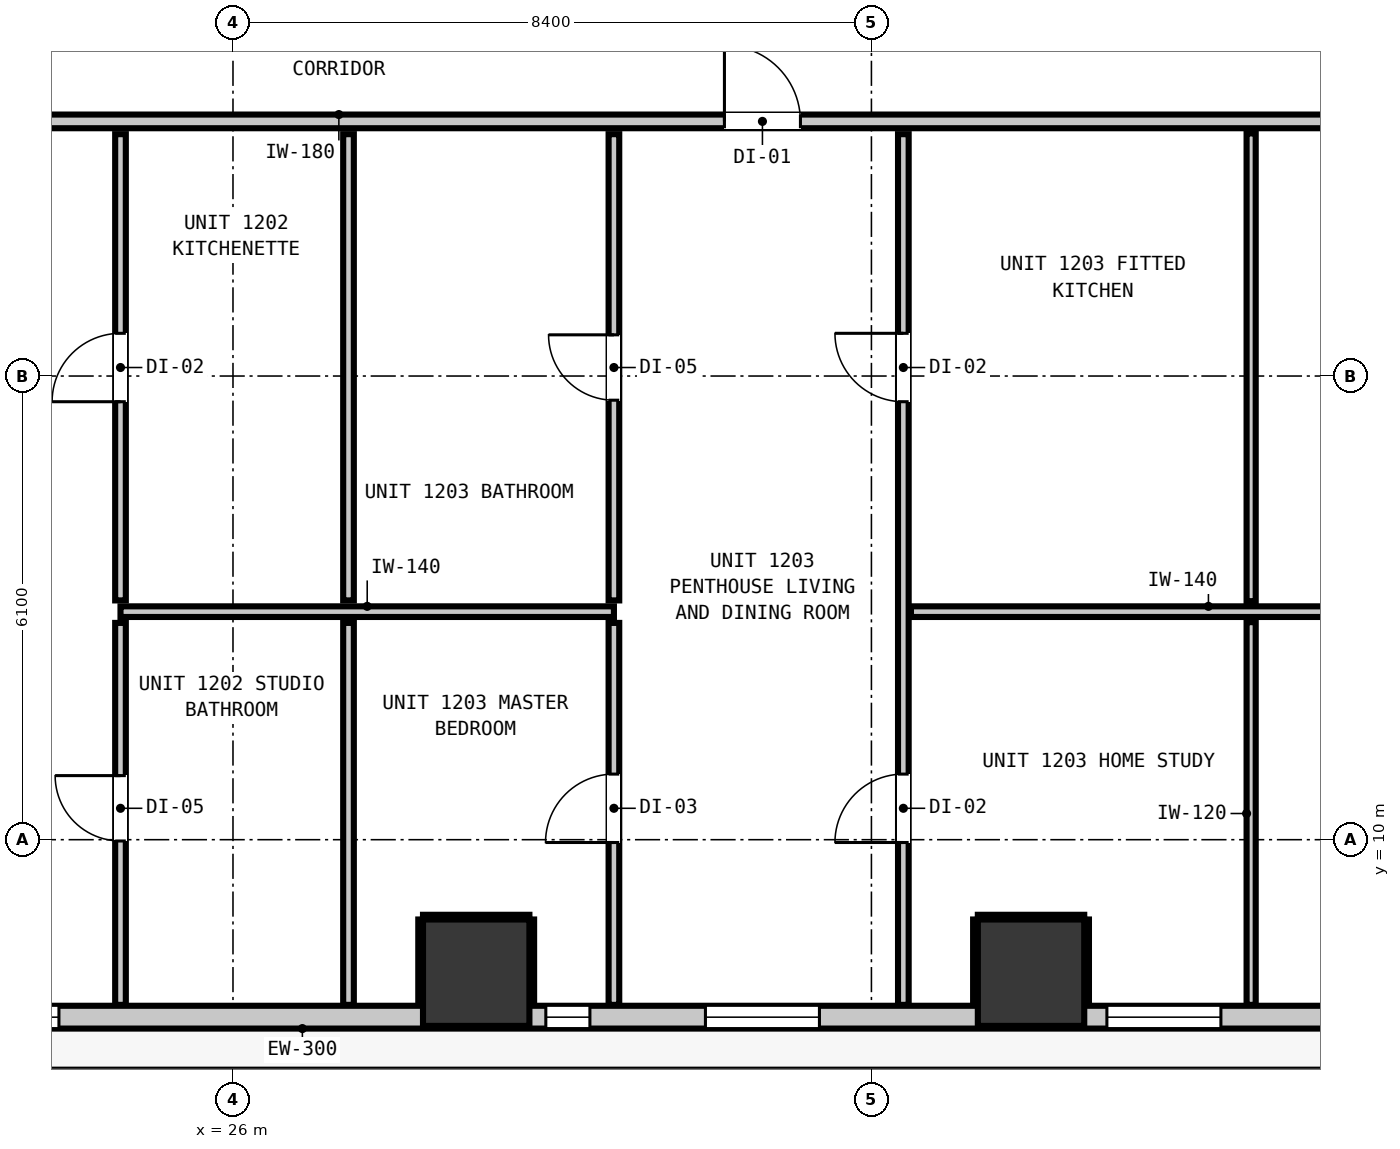
"""IFC4 building model, lengths in metres.
Left out: names, types, materials, properties, quantities, classifications, styles, units other than length and angle.
Written with IfcOpenShell. Run it as: python <this file> out.ifc"""

import sys

from ifc_helpers import new_model, si_unit, direction, frame, frame_2d, origin, origin_2d, place, context, subcontext, project, spatial, rectangle, extrude, element, fill, save


model = new_model("IFC4")
c1 = context("Model", 3, precision=1e-05, world=origin(), true_north=direction((0.0, 1.0)))
c2 = subcontext(c1, "Body", "Model", "MODEL_VIEW")
j1 = project(units=[si_unit("LENGTHUNIT", "METRE"), si_unit("PLANEANGLEUNIT", "RADIAN")], contexts=[c1])
p1 = place(None, origin())
s1 = spatial("IfcSite", under=j1, at=p1, CompositionType="ELEMENT")
p2 = place(p1, origin())
s2 = spatial("IfcBuilding", under=s1, at=p2, CompositionType="ELEMENT")
p3 = place(p2, frame((0.0, 0.0, 45.24)))
s3 = spatial("IfcBuildingStorey", under=s2, at=p3, CompositionType="ELEMENT", Elevation=45.24)
for number, where, z_axis, x_axis in (
    (1, (29.2, 8.25, 0.0), (0.0, 0.0, 1.0), (1.0, 0.0, 0.0)),
    (2, (36.5, 8.25, 0.0), (0.0, 0.0, 1.0), (1.0, 0.0, 0.0)),
):
    element("IfcColumn", number, at=place(p3, frame(where, z_axis=z_axis, x_axis=x_axis)), inside=s3, PredefinedType="COLUMN", context=c2, shape_type="SweptSolid", body=[
        extrude(rectangle(XDim=1.4, YDim=1.4, at=origin_2d()), origin(), (0.0, 0.0, 1.0), 3.32),
    ])
p4 = place(p3, frame((47.835, 7.665, 0.0), z_axis=(0.0, 0.0, 1.0), x_axis=(-1.0, 0.0, 0.0)))
e3 = element("IfcWall", 3, at=p4, inside=s3, PredefinedType="STANDARD", context=c2, shape_type="SweptSolid", body=[
    extrude(rectangle(XDim=37.47, YDim=0.3, at=frame_2d((18.735, 0.0))), origin(), (0.0, 0.0, 1.0), 3.06),
])
p5 = place(p4, frame((1.251, 0.0, 0.0)))
e4 = element("IfcOpeningElement", 4, at=p5, cuts=e3, PredefinedType="OPENING", context=c2, shape_type="SweptSolid", body=[
    extrude(rectangle(XDim=1.0, YDim=2.15, at=frame_2d((0.5, 1.075))), frame((0.0, 0.16, 0.0), z_axis=(0.0, -1.0, 0.0), x_axis=(1.0, 0.0, 0.0)), (0.0, 0.0, 1.0), 0.32),
])
p6 = place(p4, frame((30.525, 0.0, 0.85)))
e5 = element("IfcOpeningElement", 5, at=p6, cuts=e3, PredefinedType="OPENING", context=c2, shape_type="SweptSolid", body=[
    extrude(rectangle(XDim=1.5, YDim=1.8, at=frame_2d((0.75, 0.9))), frame((0.0, 0.16, 0.0), z_axis=(0.0, -1.0, 0.0), x_axis=(1.0, 0.0, 0.0)), (0.0, 0.0, 1.0), 0.32),
])
p7 = place(p4, frame((24.125, 0.0, 0.85)))
e6 = element("IfcOpeningElement", 6, at=p7, cuts=e3, PredefinedType="OPENING", context=c2, shape_type="SweptSolid", body=[
    extrude(rectangle(XDim=1.5, YDim=1.8, at=frame_2d((0.75, 0.9))), frame((0.0, 0.16, 0.0), z_axis=(0.0, -1.0, 0.0), x_axis=(1.0, 0.0, 0.0)), (0.0, 0.0, 1.0), 0.32),
])
p8 = place(p4, frame((14.119, 0.0, 0.85)))
e7 = element("IfcOpeningElement", 7, at=p8, cuts=e3, PredefinedType="OPENING", context=c2, shape_type="SweptSolid", body=[
    extrude(rectangle(XDim=1.5, YDim=1.8, at=frame_2d((0.75, 0.9))), frame((0.0, 0.16, 0.0), z_axis=(0.0, -1.0, 0.0), x_axis=(1.0, 0.0, 0.0)), (0.0, 0.0, 1.0), 0.32),
])
p9 = place(p4, frame((17.139, 0.0, 0.85)))
e8 = element("IfcOpeningElement", 8, at=p9, cuts=e3, PredefinedType="OPENING", context=c2, shape_type="SweptSolid", body=[
    extrude(rectangle(XDim=0.58, YDim=1.5, at=frame_2d((0.29, 0.75))), frame((0.0, 0.16, 0.0), z_axis=(0.0, -1.0, 0.0), x_axis=(1.0, 0.0, 0.0)), (0.0, 0.0, 1.0), 0.32),
])
p10 = place(p4, frame((8.837, 0.0, 0.85)))
e9 = element("IfcOpeningElement", 9, at=p10, cuts=e3, PredefinedType="OPENING", context=c2, shape_type="SweptSolid", body=[
    extrude(rectangle(XDim=1.5, YDim=1.8, at=frame_2d((0.75, 0.9))), frame((0.0, 0.16, 0.0), z_axis=(0.0, -1.0, 0.0), x_axis=(1.0, 0.0, 0.0)), (0.0, 0.0, 1.0), 0.32),
])
p11 = place(p4, frame((4.645, 0.0, 0.85)))
e10 = element("IfcOpeningElement", 10, at=p11, cuts=e3, PredefinedType="OPENING", context=c2, shape_type="SweptSolid", body=[
    extrude(rectangle(XDim=1.5, YDim=1.8, at=frame_2d((0.75, 0.9))), frame((0.0, 0.16, 0.0), z_axis=(0.0, -1.0, 0.0), x_axis=(1.0, 0.0, 0.0)), (0.0, 0.0, 1.0), 0.32),
])
p12 = place(p3, frame((8.027, 19.45, 0.0), z_axis=(0.0, 0.0, 1.0), x_axis=(1.0, 0.0, 0.0)))
e11 = element("IfcWall", 11, at=p12, inside=s3, PredefinedType="PARTITIONING", context=c2, shape_type="SweptSolid", body=[
    extrude(rectangle(XDim=42.146, YDim=0.18, at=frame_2d((21.073, 0.0))), origin(), (0.0, 0.0, 1.0), 3.06),
])
p13 = place(p12, frame((6.533, 0.0, 0.0)))
e12 = element("IfcOpeningElement", 12, at=p13, cuts=e11, PredefinedType="OPENING", context=c2, shape_type="SweptSolid", body=[
    extrude(rectangle(XDim=1.0, YDim=2.15, at=frame_2d((0.5, 1.075))), frame((0.0, 0.1, 0.0), z_axis=(0.0, -1.0, 0.0), x_axis=(1.0, 0.0, 0.0)), (0.0, 0.0, 1.0), 0.2),
])
p14 = place(p12, frame((13.293, 0.0, 0.0)))
e13 = element("IfcOpeningElement", 13, at=p14, cuts=e11, PredefinedType="OPENING", context=c2, shape_type="SweptSolid", body=[
    extrude(rectangle(XDim=1.0, YDim=2.15, at=frame_2d((0.5, 1.075))), frame((0.0, 0.1, 0.0), z_axis=(0.0, -1.0, 0.0), x_axis=(1.0, 0.0, 0.0)), (0.0, 0.0, 1.0), 0.2),
])
p15 = place(p12, frame((24.439, 0.0, 0.0)))
e14 = element("IfcOpeningElement", 14, at=p15, cuts=e11, PredefinedType="OPENING", context=c2, shape_type="SweptSolid", body=[
    extrude(rectangle(XDim=1.0, YDim=2.15, at=frame_2d((0.5, 1.075))), frame((0.0, 0.1, 0.0), z_axis=(0.0, -1.0, 0.0), x_axis=(1.0, 0.0, 0.0)), (0.0, 0.0, 1.0), 0.2),
])
p16 = place(p12, frame((34.771, 0.0, 0.0)))
e15 = element("IfcOpeningElement", 15, at=p16, cuts=e11, PredefinedType="OPENING", context=c2, shape_type="SweptSolid", body=[
    extrude(rectangle(XDim=1.0, YDim=2.15, at=frame_2d((0.5, 1.075))), frame((0.0, 0.1, 0.0), z_axis=(0.0, -1.0, 0.0), x_axis=(1.0, 0.0, 0.0)), (0.0, 0.0, 1.0), 0.2),
])
p17 = place(p3, frame((24.52, 13.0, 0.0), z_axis=(0.0, 0.0, 1.0), x_axis=(1.0, 0.0, 0.0)))
e16 = element("IfcWall", 16, at=p17, inside=s3, PredefinedType="PARTITIONING", context=c2, shape_type="SweptSolid", body=[
    extrude(rectangle(XDim=6.492, YDim=0.14, at=frame_2d((3.246, 0.0))), origin(), (0.0, 0.0, 1.0), 3.06),
])
p18 = place(p3, frame((34.92, 13.0, 0.0), z_axis=(0.0, 0.0, 1.0), x_axis=(1.0, 0.0, 0.0)))
e17 = element("IfcWall", 17, at=p18, inside=s3, PredefinedType="PARTITIONING", context=c2, shape_type="SweptSolid", body=[
    extrude(rectangle(XDim=15.253, YDim=0.14, at=frame_2d((7.626, 0.0))), origin(), (0.0, 0.0, 1.0), 3.06),
])
p19 = place(p18, frame((7.928, 0.0, 0.0)))
e18 = element("IfcOpeningElement", 18, at=p19, cuts=e17, PredefinedType="OPENING", context=c2, shape_type="SweptSolid", body=[
    extrude(rectangle(XDim=0.9, YDim=2.1, at=frame_2d((0.45, 1.05))), frame((0.0, 0.08, 0.0), z_axis=(0.0, -1.0, 0.0), x_axis=(1.0, 0.0, 0.0)), (0.0, 0.0, 1.0), 0.16),
])
p20 = place(p3, frame((24.52, 7.827, 0.0), z_axis=(0.0, 0.0, 1.0), x_axis=(0.0, 1.0, 0.0)))
e19 = element("IfcWall", 19, at=p20, inside=s3, PredefinedType="PARTITIONING", context=c2, shape_type="SweptSolid", body=[
    extrude(rectangle(XDim=5.025, YDim=0.14, at=frame_2d((2.513, 0.0))), origin(), (0.0, 0.0, 1.0), 3.06),
])
p21 = place(p20, frame((2.156, 0.0, 0.0)))
e20 = element("IfcOpeningElement", 20, at=p21, cuts=e19, PredefinedType="OPENING", context=c2, shape_type="SweptSolid", body=[
    extrude(rectangle(XDim=0.86, YDim=2.02, at=frame_2d((0.43, 1.01))), frame((0.0, 0.08, 0.0), z_axis=(0.0, -1.0, 0.0), x_axis=(1.0, 0.0, 0.0)), (0.0, 0.0, 1.0), 0.16),
])
p22 = place(p3, frame((24.52, 13.148, 0.0), z_axis=(0.0, 0.0, 1.0), x_axis=(0.0, 1.0, 0.0)))
e21 = element("IfcWall", 21, at=p22, inside=s3, PredefinedType="PARTITIONING", context=c2, shape_type="SweptSolid", body=[
    extrude(rectangle(XDim=6.134, YDim=0.14, at=frame_2d((3.067, 0.0))), origin(), (0.0, 0.0, 1.0), 3.06),
])
p23 = place(p22, frame((2.614, 0.0, 0.0)))
e22 = element("IfcOpeningElement", 22, at=p23, cuts=e21, PredefinedType="OPENING", context=c2, shape_type="SweptSolid", body=[
    extrude(rectangle(XDim=0.9, YDim=2.1, at=frame_2d((0.45, 1.05))), frame((0.0, 0.08, 0.0), z_axis=(0.0, -1.0, 0.0), x_axis=(1.0, 0.0, 0.0)), (0.0, 0.0, 1.0), 0.16),
])
p24 = place(p3, frame((27.52, 7.827, 0.0), z_axis=(0.0, 0.0, 1.0), x_axis=(0.0, 1.0, 0.0)))
e23 = element("IfcWall", 23, at=p24, inside=s3, PredefinedType="PARTITIONING", context=c2, shape_type="SweptSolid", body=[
    extrude(rectangle(XDim=5.025, YDim=0.14, at=frame_2d((2.513, 0.0))), origin(), (0.0, 0.0, 1.0), 3.06),
])
p25 = place(p3, frame((27.52, 13.148, 0.0), z_axis=(0.0, 0.0, 1.0), x_axis=(0.0, 1.0, 0.0)))
e24 = element("IfcWall", 24, at=p25, inside=s3, PredefinedType="PARTITIONING", context=c2, shape_type="SweptSolid", body=[
    extrude(rectangle(XDim=6.134, YDim=0.14, at=frame_2d((3.067, 0.0))), origin(), (0.0, 0.0, 1.0), 3.06),
])
p26 = place(p3, frame((31.012, 7.827, 0.0), z_axis=(0.0, 0.0, 1.0), x_axis=(0.0, 1.0, 0.0)))
e25 = element("IfcWall", 25, at=p26, inside=s3, PredefinedType="PARTITIONING", context=c2, shape_type="SweptSolid", body=[
    extrude(rectangle(XDim=5.025, YDim=0.14, at=frame_2d((2.513, 0.0))), origin(), (0.0, 0.0, 1.0), 3.06),
])
p27 = place(p26, frame((2.136, 0.0, 0.0)))
e26 = element("IfcOpeningElement", 26, at=p27, cuts=e25, PredefinedType="OPENING", context=c2, shape_type="SweptSolid", body=[
    extrude(rectangle(XDim=0.9, YDim=2.1, at=frame_2d((0.45, 1.05))), frame((0.0, 0.08, 0.0), z_axis=(0.0, -1.0, 0.0), x_axis=(1.0, 0.0, 0.0)), (0.0, 0.0, 1.0), 0.16),
])
p28 = place(p3, frame((31.012, 13.148, 0.0), z_axis=(0.0, 0.0, 1.0), x_axis=(0.0, 1.0, 0.0)))
e27 = element("IfcWall", 27, at=p28, inside=s3, PredefinedType="PARTITIONING", context=c2, shape_type="SweptSolid", body=[
    extrude(rectangle(XDim=6.134, YDim=0.14, at=frame_2d((3.067, 0.0))), origin(), (0.0, 0.0, 1.0), 3.06),
])
p29 = place(p28, frame((2.634, 0.0, 0.0)))
e28 = element("IfcOpeningElement", 28, at=p29, cuts=e27, PredefinedType="OPENING", context=c2, shape_type="SweptSolid", body=[
    extrude(rectangle(XDim=0.86, YDim=2.02, at=frame_2d((0.43, 1.01))), frame((0.0, 0.08, 0.0), z_axis=(0.0, -1.0, 0.0), x_axis=(1.0, 0.0, 0.0)), (0.0, 0.0, 1.0), 0.16),
])
p30 = place(p3, frame((34.82, 7.827, 0.0), z_axis=(0.0, 0.0, 1.0), x_axis=(0.0, 1.0, 0.0)))
e29 = element("IfcWall", 29, at=p30, inside=s3, PredefinedType="PARTITIONING", context=c2, shape_type="SweptSolid", body=[
    extrude(rectangle(XDim=11.455, YDim=0.14, at=frame_2d((5.728, 0.0))), origin(), (0.0, 0.0, 1.0), 3.06),
])
p31 = place(p30, frame((7.935, 0.0, 0.0)))
e30 = element("IfcOpeningElement", 30, at=p31, cuts=e29, PredefinedType="OPENING", context=c2, shape_type="SweptSolid", body=[
    extrude(rectangle(XDim=0.9, YDim=2.1, at=frame_2d((0.45, 1.05))), frame((0.0, 0.08, 0.0), z_axis=(0.0, -1.0, 0.0), x_axis=(1.0, 0.0, 0.0)), (0.0, 0.0, 1.0), 0.16),
])
p32 = place(p30, frame((2.136, 0.0, 0.0)))
e31 = element("IfcOpeningElement", 31, at=p32, cuts=e29, PredefinedType="OPENING", context=c2, shape_type="SweptSolid", body=[
    extrude(rectangle(XDim=0.9, YDim=2.1, at=frame_2d((0.45, 1.05))), frame((0.0, 0.08, 0.0), z_axis=(0.0, -1.0, 0.0), x_axis=(1.0, 0.0, 0.0)), (0.0, 0.0, 1.0), 0.16),
])
p33 = place(p3, frame((39.396, 7.827, 0.0), z_axis=(0.0, 0.0, 1.0), x_axis=(0.0, 1.0, 0.0)))
e32 = element("IfcWall", 32, at=p33, inside=s3, PredefinedType="PARTITIONING", context=c2, shape_type="SweptSolid", body=[
    extrude(rectangle(XDim=5.035, YDim=0.12, at=frame_2d((2.518, 0.0))), origin(), (0.0, 0.0, 1.0), 3.06),
])
p34 = place(p3, frame((39.396, 13.138, 0.0), z_axis=(0.0, 0.0, 1.0), x_axis=(0.0, 1.0, 0.0)))
e33 = element("IfcWall", 33, at=p34, inside=s3, PredefinedType="PARTITIONING", context=c2, shape_type="SweptSolid", body=[
    extrude(rectangle(XDim=6.154, YDim=0.12, at=frame_2d((3.077, 0.0))), origin(), (0.0, 0.0, 1.0), 3.06),
])
p35 = place(p3, frame((28.5, 8.982, 0.0), z_axis=(0.0, 0.0, 1.0), x_axis=(1.0, 0.0, 0.0)))
e34 = element("IfcWall", 34, at=p35, inside=s3, PredefinedType="PARTITIONING", context=c2, shape_type="SweptSolid", body=[
    extrude(rectangle(XDim=1.4, YDim=0.06, at=frame_2d((0.7, 0.0))), origin(), (0.0, 0.0, 1.0), 1.45),
])
for number, where, z_axis, x_axis in (
    (35, (28.468, 7.83, 0.0), (0.0, 0.0, 1.0), (0.0, 1.0, 0.0)),
    (36, (29.932, 7.83, 0.0), (0.0, 0.0, 1.0), (0.0, 1.0, 0.0)),
):
    element("IfcWall", number, at=place(p3, frame(where, z_axis=z_axis, x_axis=x_axis)), inside=s3, PredefinedType="PARTITIONING", context=c2, shape_type="SweptSolid", body=[
        extrude(rectangle(XDim=1.12, YDim=0.06, at=frame_2d((0.56, 0.0))), origin(), (0.0, 0.0, 1.0), 1.45),
    ])
p36 = place(p3, frame((35.8, 8.982, 0.0), z_axis=(0.0, 0.0, 1.0), x_axis=(1.0, 0.0, 0.0)))
e37 = element("IfcWall", 37, at=p36, inside=s3, PredefinedType="PARTITIONING", context=c2, shape_type="SweptSolid", body=[
    extrude(rectangle(XDim=1.4, YDim=0.06, at=frame_2d((0.7, 0.0))), origin(), (0.0, 0.0, 1.0), 1.45),
])
for number, where, z_axis, x_axis in (
    (38, (35.768, 7.83, 0.0), (0.0, 0.0, 1.0), (0.0, 1.0, 0.0)),
    (39, (37.232, 7.83, 0.0), (0.0, 0.0, 1.0), (0.0, 1.0, 0.0)),
):
    element("IfcWall", number, at=place(p3, frame(where, z_axis=z_axis, x_axis=x_axis)), inside=s3, PredefinedType="PARTITIONING", context=c2, shape_type="SweptSolid", body=[
        extrude(rectangle(XDim=1.12, YDim=0.06, at=frame_2d((0.56, 0.0))), origin(), (0.0, 0.0, 1.0), 1.45),
    ])
p37 = place(p7, origin())
e40 = element("IfcWindow", 40, at=p37, inside=s3, PartitioningType="SINGLE_PANEL", PredefinedType="WINDOW", context=c2, shape_type="SweptSolid", body=[
    extrude(rectangle(XDim=1.5, YDim=1.8, at=frame_2d((0.75, 0.9))), frame((0.0, 0.03, 0.0), z_axis=(0.0, -1.0, 0.0), x_axis=(1.0, 0.0, 0.0)), (0.0, 0.0, 1.0), 0.06),
])
fill(e6, e40)
p38 = place(p8, origin())
e41 = element("IfcWindow", 41, at=p38, inside=s3, PartitioningType="SINGLE_PANEL", PredefinedType="WINDOW", context=c2, shape_type="SweptSolid", body=[
    extrude(rectangle(XDim=1.5, YDim=1.8, at=frame_2d((0.75, 0.9))), frame((0.0, 0.03, 0.0), z_axis=(0.0, -1.0, 0.0), x_axis=(1.0, 0.0, 0.0)), (0.0, 0.0, 1.0), 0.06),
])
fill(e7, e41)
p39 = place(p9, origin())
e42 = element("IfcWindow", 42, at=p39, inside=s3, PartitioningType="SINGLE_PANEL", PredefinedType="WINDOW", context=c2, shape_type="SweptSolid", body=[
    extrude(rectangle(XDim=0.58, YDim=1.5, at=frame_2d((0.29, 0.75))), frame((0.0, 0.03, 0.0), z_axis=(0.0, -1.0, 0.0), x_axis=(1.0, 0.0, 0.0)), (0.0, 0.0, 1.0), 0.06),
])
fill(e8, e42)
p40 = place(p10, origin())
e43 = element("IfcWindow", 43, at=p40, inside=s3, PartitioningType="SINGLE_PANEL", PredefinedType="WINDOW", context=c2, shape_type="SweptSolid", body=[
    extrude(rectangle(XDim=1.5, YDim=1.8, at=frame_2d((0.75, 0.9))), frame((0.0, 0.03, 0.0), z_axis=(0.0, -1.0, 0.0), x_axis=(1.0, 0.0, 0.0)), (0.0, 0.0, 1.0), 0.06),
])
fill(e9, e43)
p41 = place(p23, origin())
e44 = element("IfcDoor", 44, at=p41, inside=s3, OperationType="SINGLE_SWING_LEFT", PredefinedType="DOOR", context=c2, shape_type="SweptSolid", body=[
    extrude(rectangle(XDim=0.9, YDim=2.1, at=frame_2d((0.45, 1.05))), frame((0.0, 0.025, 0.0), z_axis=(0.0, -1.0, 0.0), x_axis=(1.0, 0.0, 0.0)), (0.0, 0.0, 1.0), 0.05),
])
fill(e22, e44)
p42 = place(p21, origin())
e45 = element("IfcDoor", 45, at=p42, inside=s3, OperationType="SINGLE_SWING_RIGHT", PredefinedType="DOOR", context=c2, shape_type="SweptSolid", body=[
    extrude(rectangle(XDim=0.86, YDim=2.02, at=frame_2d((0.43, 1.01))), frame((0.0, 0.025, 0.0), z_axis=(0.0, -1.0, 0.0), x_axis=(1.0, 0.0, 0.0)), (0.0, 0.0, 1.0), 0.05),
])
fill(e20, e45)
p43 = place(p15, origin())
e46 = element("IfcDoor", 46, at=p43, inside=s3, OperationType="SINGLE_SWING_LEFT", PredefinedType="DOOR", context=c2, shape_type="SweptSolid", body=[
    extrude(rectangle(XDim=1.0, YDim=2.15, at=frame_2d((0.5, 1.075))), frame((0.0, 0.025, 0.0), z_axis=(0.0, -1.0, 0.0), x_axis=(1.0, 0.0, 0.0)), (0.0, 0.0, 1.0), 0.05),
])
fill(e14, e46)
p44 = place(p29, origin())
e47 = element("IfcDoor", 47, at=p44, inside=s3, OperationType="SINGLE_SWING_RIGHT", PredefinedType="DOOR", context=c2, shape_type="SweptSolid", body=[
    extrude(rectangle(XDim=0.86, YDim=2.02, at=frame_2d((0.43, 1.01))), frame((0.0, 0.025, 0.0), z_axis=(0.0, -1.0, 0.0), x_axis=(1.0, 0.0, 0.0)), (0.0, 0.0, 1.0), 0.05),
])
fill(e28, e47)
p45 = place(p27, origin())
e48 = element("IfcDoor", 48, at=p45, inside=s3, OperationType="SINGLE_SWING_LEFT", PredefinedType="DOOR", context=c2, shape_type="SweptSolid", body=[
    extrude(rectangle(XDim=0.9, YDim=2.1, at=frame_2d((0.45, 1.05))), frame((0.0, 0.025, 0.0), z_axis=(0.0, -1.0, 0.0), x_axis=(1.0, 0.0, 0.0)), (0.0, 0.0, 1.0), 0.05),
])
fill(e26, e48)
p46 = place(p31, origin())
e49 = element("IfcDoor", 49, at=p46, inside=s3, OperationType="SINGLE_SWING_RIGHT", PredefinedType="DOOR", context=c2, shape_type="SweptSolid", body=[
    extrude(rectangle(XDim=0.9, YDim=2.1, at=frame_2d((0.45, 1.05))), frame((0.0, 0.025, 0.0), z_axis=(0.0, -1.0, 0.0), x_axis=(1.0, 0.0, 0.0)), (0.0, 0.0, 1.0), 0.05),
])
fill(e30, e49)
p47 = place(p32, origin())
e50 = element("IfcDoor", 50, at=p47, inside=s3, OperationType="SINGLE_SWING_LEFT", PredefinedType="DOOR", context=c2, shape_type="SweptSolid", body=[
    extrude(rectangle(XDim=0.9, YDim=2.1, at=frame_2d((0.45, 1.05))), frame((0.0, 0.025, 0.0), z_axis=(0.0, -1.0, 0.0), x_axis=(1.0, 0.0, 0.0)), (0.0, 0.0, 1.0), 0.05),
])
fill(e31, e50)
save(model, sys.argv[1])
